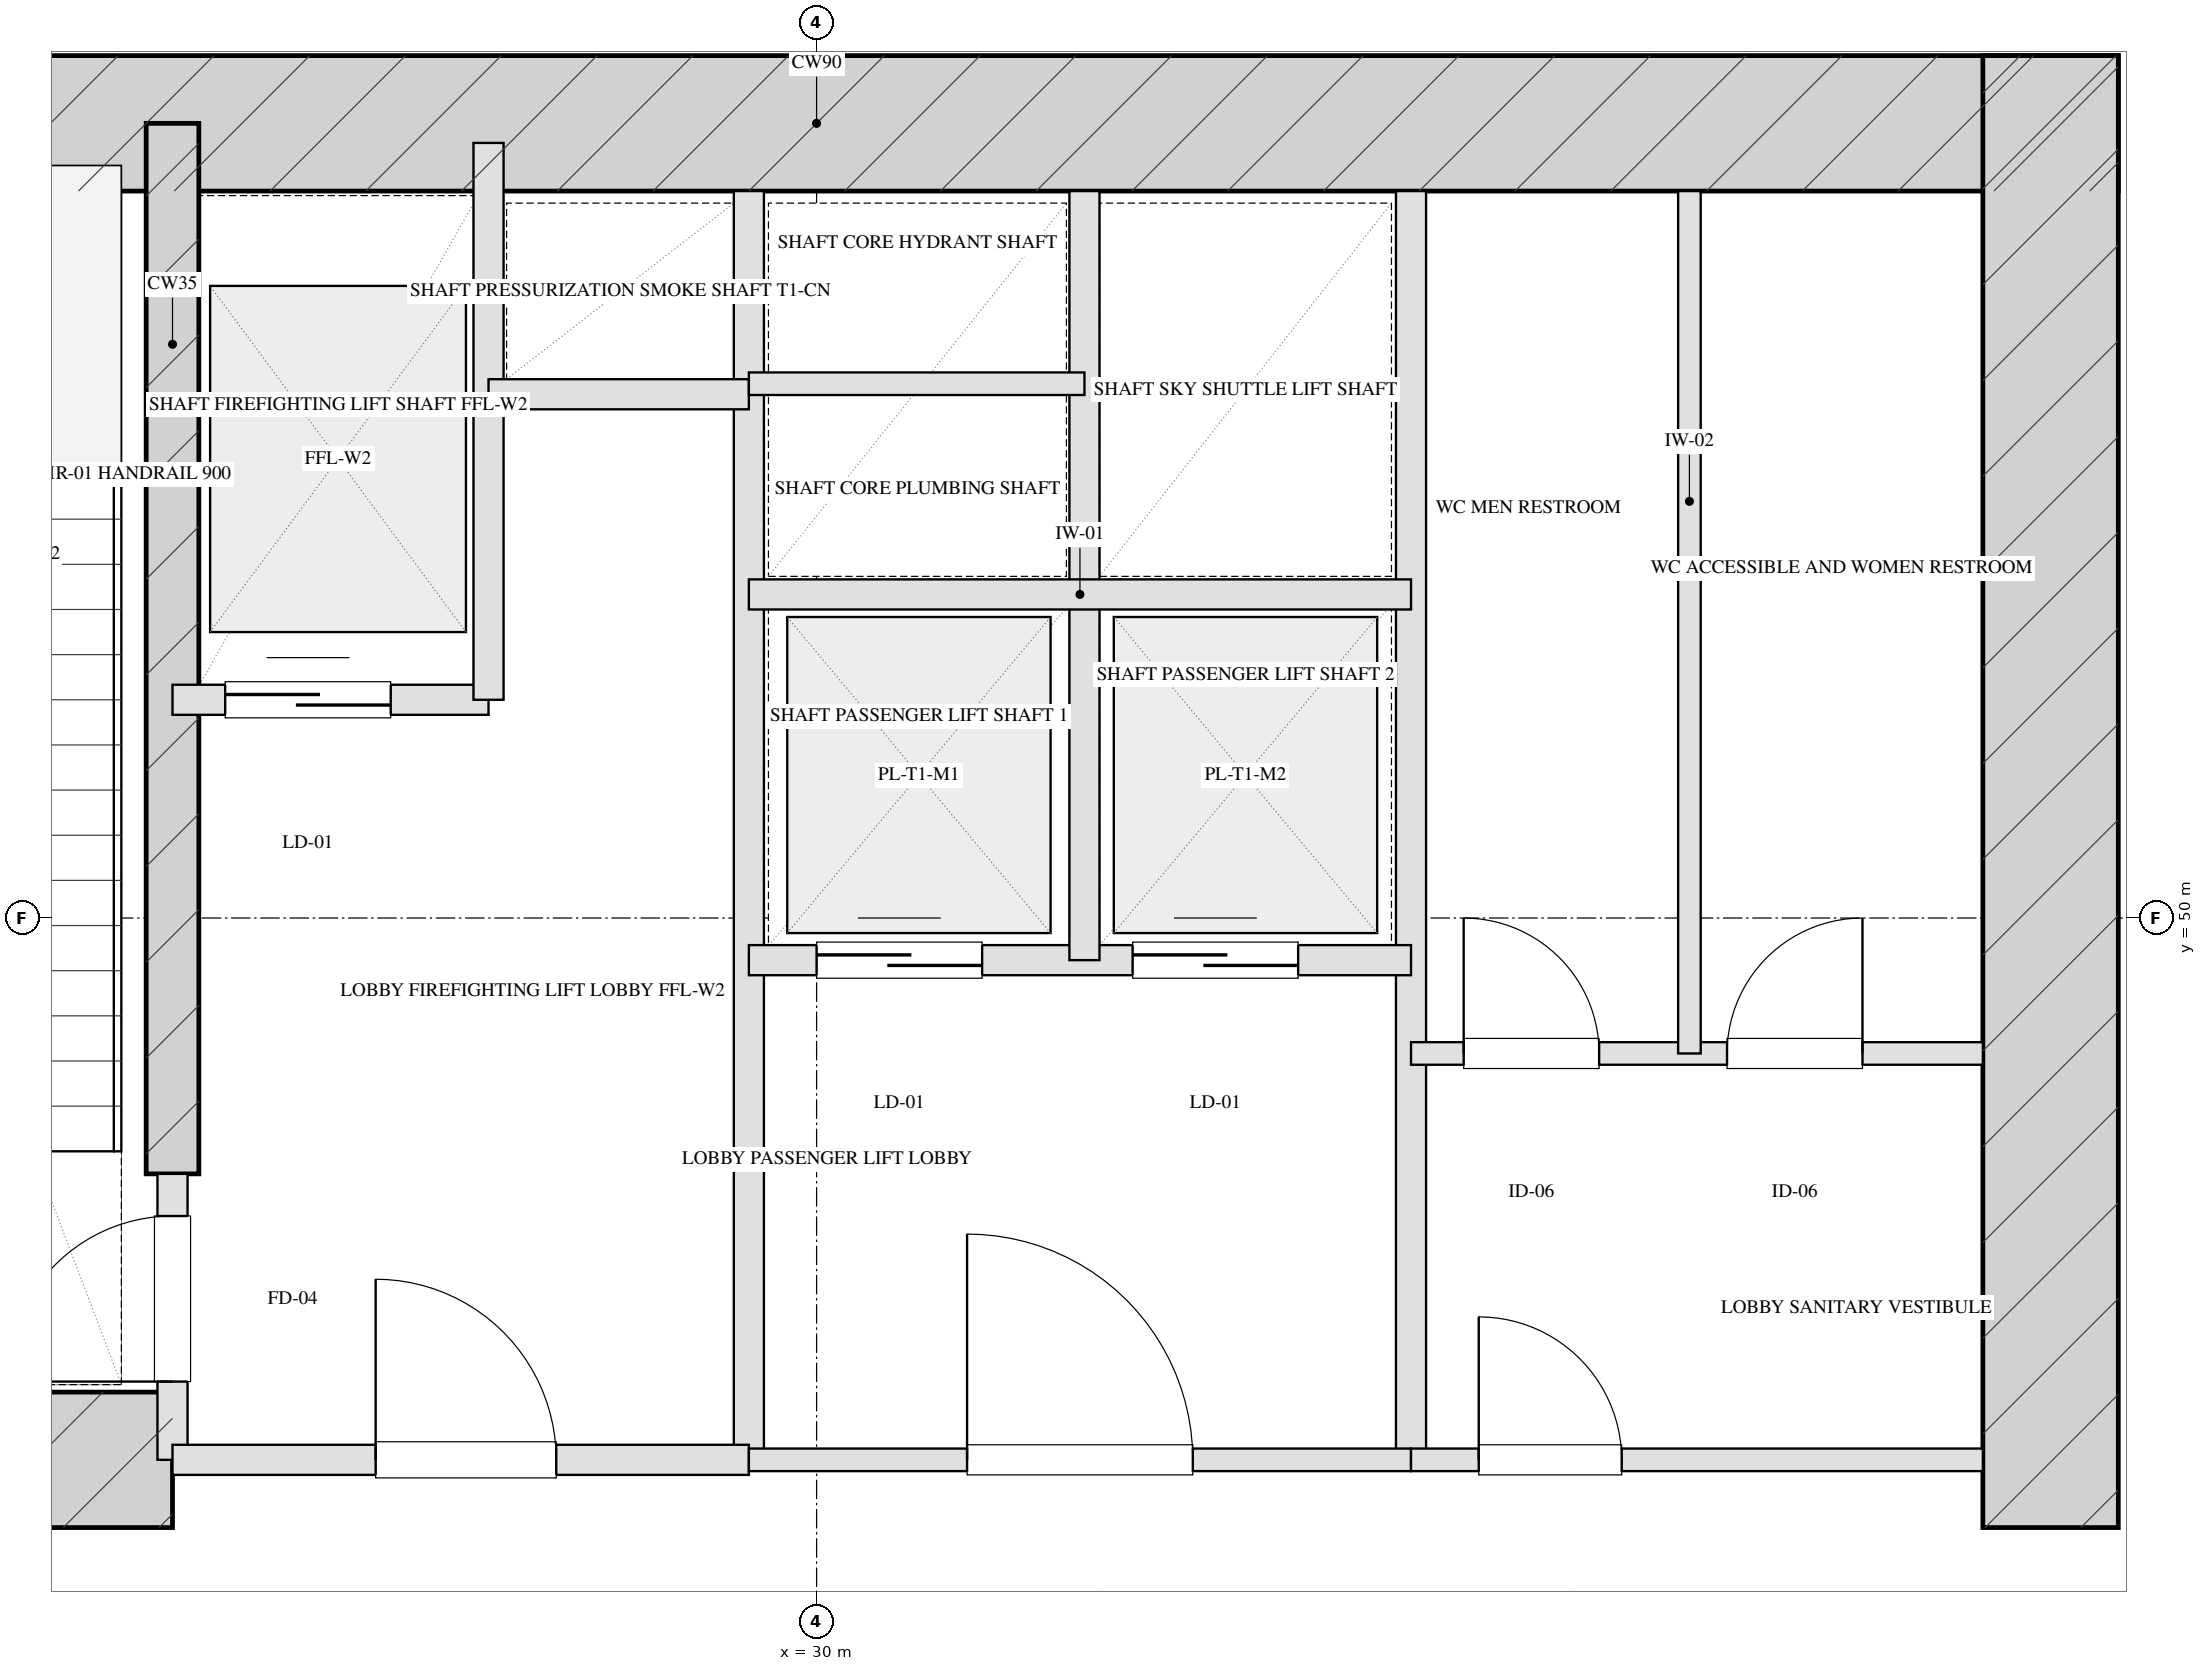
"""IFC4 building model, lengths in metres.
Left out: names, types, materials, properties, quantities, classifications, styles, units other than length and angle.
Written with IfcOpenShell. Run it as: python <this file> out.ifc"""

import sys

from ifc_helpers import new_model, si_unit, direction, frame, frame_2d, origin, place, context, subcontext, project, spatial, rectangle, extrude, element, fill, save


model = new_model("IFC4")
c1 = context("Model", 3, precision=1e-05, world=origin(), true_north=direction((0.0, 1.0)))
c2 = subcontext(c1, "Body", "Model", "MODEL_VIEW")
j1 = project(units=[si_unit("LENGTHUNIT", "METRE"), si_unit("PLANEANGLEUNIT", "RADIAN")], contexts=[c1])
p1 = place(None, origin())
s1 = spatial("IfcSite", under=j1, at=p1, CompositionType="ELEMENT")
p2 = place(p1, origin())
s2 = spatial("IfcBuilding", under=s1, at=p2, CompositionType="ELEMENT")
p3 = place(p2, frame((0.0, 0.0, 6.0)))
s3 = spatial("IfcBuildingStorey", under=s2, at=p3, CompositionType="ELEMENT", Elevation=6.0)
p4 = place(p3, frame((21.35, 55.28, 0.0), z_axis=(0.0, 0.0, 1.0), x_axis=(1.0, 0.0, 0.0)))
e1 = element("IfcWall", 1, at=p4, inside=s3, PredefinedType="SHEAR", context=c2, shape_type="SweptSolid", body=[
    extrude(rectangle(XDim=17.3, YDim=0.9, at=frame_2d((8.65, 0.0))), origin(), (0.0, 0.0, 1.0), 5.5),
])
p5 = place(p3, frame((38.2, 45.95, 0.0), z_axis=(0.0, 0.0, 1.0), x_axis=(0.0, 1.0, 0.0)))
e2 = element("IfcWall", 2, at=p5, inside=s3, PredefinedType="SHEAR", context=c2, shape_type="SweptSolid", body=[
    extrude(rectangle(XDim=9.78, YDim=0.9, at=frame_2d((4.89, 0.0))), origin(), (0.0, 0.0, 1.0), 5.5),
])
p6 = place(p3, frame((25.72, 48.3, 0.0), z_axis=(0.0, 0.0, 1.0), x_axis=(0.0, 1.0, 0.0)))
e3 = element("IfcWall", 3, at=p6, inside=s3, PredefinedType="SHEAR", context=c2, shape_type="SweptSolid", body=[
    extrude(rectangle(XDim=6.98, YDim=0.35, at=frame_2d((3.49, 0.0))), origin(), (0.0, 0.0, 1.0), 5.5),
])
p7 = place(p3, frame((21.35, 46.4, 0.0), z_axis=(0.0, 0.0, 1.0), x_axis=(1.0, 0.0, 0.0)))
e4 = element("IfcWall", 4, at=p7, inside=s3, PredefinedType="SHEAR", context=c2, shape_type="SweptSolid", body=[
    extrude(rectangle(XDim=4.37, YDim=0.9, at=frame_2d((2.185, 0.0))), origin(), (0.0, 0.0, 1.0), 5.5),
])
p8 = place(p3, frame((25.72, 46.4, 0.0), z_axis=(0.0, 0.0, 1.0), x_axis=(0.0, 1.0, 0.0)))
e5 = element("IfcWall", 5, at=p8, inside=s3, PredefinedType="PARTITIONING", context=c2, shape_type="SweptSolid", body=[
    extrude(rectangle(XDim=1.9, YDim=0.2, at=frame_2d((0.95, 0.0))), origin(), (0.0, 0.0, 1.0), 5.185),
])
p9 = place(p8, frame((0.52, 0.0, 0.0)))
e6 = element("IfcOpeningElement", 6, at=p9, cuts=e5, PredefinedType="OPENING", context=c2, shape_type="SweptSolid", body=[
    extrude(rectangle(XDim=1.1, YDim=2.05, at=frame_2d((0.55, 1.025))), frame((0.0, 0.11, 0.0), z_axis=(0.0, -1.0, 0.0), x_axis=(1.0, 0.0, 0.0)), (0.0, 0.0, 1.0), 0.22),
])
p10 = place(p3, frame((29.55, 46.4, 0.0), z_axis=(0.0, 0.0, 1.0), x_axis=(0.0, 1.0, 0.0)))
e7 = element("IfcWall", 7, at=p10, inside=s3, PredefinedType="PARTITIONING", context=c2, shape_type="SweptSolid", body=[
    extrude(rectangle(XDim=8.43, YDim=0.2, at=frame_2d((4.215, 0.0))), origin(), (0.0, 0.0, 1.0), 5.185),
])
p11 = place(p3, frame((25.72, 46.4, 0.0), z_axis=(0.0, 0.0, 1.0), x_axis=(1.0, 0.0, 0.0)))
e8 = element("IfcWall", 8, at=p11, inside=s3, PredefinedType="PARTITIONING", context=c2, shape_type="SweptSolid", body=[
    extrude(rectangle(XDim=3.83, YDim=0.2, at=frame_2d((1.915, 0.0))), origin(), (0.0, 0.0, 1.0), 5.185),
])
p12 = place(p11, frame((1.35, 0.0, 0.0)))
e9 = element("IfcOpeningElement", 9, at=p12, cuts=e8, PredefinedType="OPENING", context=c2, shape_type="SweptSolid", body=[
    extrude(rectangle(XDim=1.2, YDim=2.05, at=frame_2d((0.6, 1.025))), frame((0.0, 0.11, 0.0), z_axis=(0.0, -1.0, 0.0), x_axis=(1.0, 0.0, 0.0)), (0.0, 0.0, 1.0), 0.22),
])
p13 = place(p3, frame((25.72, 51.45, 0.0), z_axis=(0.0, 0.0, 1.0), x_axis=(1.0, 0.0, 0.0)))
e10 = element("IfcWall", 10, at=p13, inside=s3, PredefinedType="PARTITIONING", context=c2, shape_type="SweptSolid", body=[
    extrude(rectangle(XDim=2.1, YDim=0.2, at=frame_2d((1.05, 0.0))), origin(), (0.0, 0.0, 1.0), 5.185),
])
p14 = place(p13, frame((0.35, 0.0, 0.0)))
e11 = element("IfcOpeningElement", 11, at=p14, cuts=e10, PredefinedType="OPENING", context=c2, shape_type="SweptSolid", body=[
    extrude(rectangle(XDim=1.1, YDim=2.05, at=frame_2d((0.55, 1.025))), frame((0.0, 0.11, 0.0), z_axis=(0.0, -1.0, 0.0), x_axis=(1.0, 0.0, 0.0)), (0.0, 0.0, 1.0), 0.22),
])
p15 = place(p3, frame((27.82, 51.45, 0.0), z_axis=(0.0, 0.0, 1.0), x_axis=(0.0, 1.0, 0.0)))
e12 = element("IfcWall", 12, at=p15, inside=s3, PredefinedType="PARTITIONING", context=c2, shape_type="SweptSolid", body=[
    extrude(rectangle(XDim=3.7, YDim=0.2, at=frame_2d((1.85, 0.0))), origin(), (0.0, 0.0, 1.0), 5.185),
])
p16 = place(p3, frame((27.82, 53.48, 0.0), z_axis=(0.0, 0.0, 1.0), x_axis=(1.0, 0.0, 0.0)))
e13 = element("IfcWall", 13, at=p16, inside=s3, PredefinedType="PARTITIONING", context=c2, shape_type="SweptSolid", body=[
    extrude(rectangle(XDim=1.73, YDim=0.2, at=frame_2d((0.865, 0.0))), origin(), (0.0, 0.0, 1.0), 5.185),
])
p17 = place(p3, frame((33.95, 46.4, 0.0), z_axis=(0.0, 0.0, 1.0), x_axis=(0.0, 1.0, 0.0)))
e14 = element("IfcWall", 14, at=p17, inside=s3, PredefinedType="PARTITIONING", context=c2, shape_type="SweptSolid", body=[
    extrude(rectangle(XDim=8.43, YDim=0.2, at=frame_2d((4.215, 0.0))), origin(), (0.0, 0.0, 1.0), 5.185),
])
p18 = place(p3, frame((29.55, 46.4, 0.0), z_axis=(0.0, 0.0, 1.0), x_axis=(1.0, 0.0, 0.0)))
e15 = element("IfcWall", 15, at=p18, inside=s3, PredefinedType="PARTITIONING", context=c2, shape_type="SweptSolid", body=[
    extrude(rectangle(XDim=4.4, YDim=0.15, at=frame_2d((2.2, 0.0))), origin(), (0.0, 0.0, 1.0), 5.185),
])
p19 = place(p18, frame((1.45, 0.0, 0.0)))
e16 = element("IfcOpeningElement", 16, at=p19, cuts=e15, PredefinedType="OPENING", context=c2, shape_type="SweptSolid", body=[
    extrude(rectangle(XDim=1.5, YDim=2.05, at=frame_2d((0.75, 1.025))), frame((0.0, 0.085, 0.0), z_axis=(0.0, -1.0, 0.0), x_axis=(1.0, 0.0, 0.0)), (0.0, 0.0, 1.0), 0.17),
])
p20 = place(p3, frame((29.55, 49.72, 0.0), z_axis=(0.0, 0.0, 1.0), x_axis=(1.0, 0.0, 0.0)))
e17 = element("IfcWall", 17, at=p20, inside=s3, PredefinedType="PARTITIONING", context=c2, shape_type="SweptSolid", body=[
    extrude(rectangle(XDim=4.4, YDim=0.2, at=frame_2d((2.2, 0.0))), origin(), (0.0, 0.0, 1.0), 5.185),
])
p21 = place(p20, frame((0.45, 0.0, 0.0)))
e18 = element("IfcOpeningElement", 18, at=p21, cuts=e17, PredefinedType="OPENING", context=c2, shape_type="SweptSolid", body=[
    extrude(rectangle(XDim=1.1, YDim=2.05, at=frame_2d((0.55, 1.025))), frame((0.0, 0.11, 0.0), z_axis=(0.0, -1.0, 0.0), x_axis=(1.0, 0.0, 0.0)), (0.0, 0.0, 1.0), 0.22),
])
p22 = place(p20, frame((2.55, 0.0, 0.0)))
e19 = element("IfcOpeningElement", 19, at=p22, cuts=e17, PredefinedType="OPENING", context=c2, shape_type="SweptSolid", body=[
    extrude(rectangle(XDim=1.1, YDim=2.05, at=frame_2d((0.55, 1.025))), frame((0.0, 0.11, 0.0), z_axis=(0.0, -1.0, 0.0), x_axis=(1.0, 0.0, 0.0)), (0.0, 0.0, 1.0), 0.22),
])
p23 = place(p3, frame((31.78, 49.72, 0.0), z_axis=(0.0, 0.0, 1.0), x_axis=(0.0, 1.0, 0.0)))
e20 = element("IfcWall", 20, at=p23, inside=s3, PredefinedType="PARTITIONING", context=c2, shape_type="SweptSolid", body=[
    extrude(rectangle(XDim=5.11, YDim=0.2, at=frame_2d((2.555, 0.0))), origin(), (0.0, 0.0, 1.0), 5.185),
])
p24 = place(p3, frame((29.55, 52.15, 0.0), z_axis=(0.0, 0.0, 1.0), x_axis=(1.0, 0.0, 0.0)))
e21 = element("IfcWall", 21, at=p24, inside=s3, PredefinedType="PARTITIONING", context=c2, shape_type="SweptSolid", body=[
    extrude(rectangle(XDim=4.4, YDim=0.2, at=frame_2d((2.2, 0.0))), origin(), (0.0, 0.0, 1.0), 5.185),
])
p25 = place(p3, frame((29.55, 53.55, 0.0), z_axis=(0.0, 0.0, 1.0), x_axis=(1.0, 0.0, 0.0)))
e22 = element("IfcWall", 22, at=p25, inside=s3, PredefinedType="PARTITIONING", context=c2, shape_type="SweptSolid", body=[
    extrude(rectangle(XDim=2.23, YDim=0.15, at=frame_2d((1.115, 0.0))), origin(), (0.0, 0.0, 1.0), 5.185),
])
p26 = place(p3, frame((33.95, 46.4, 0.0), z_axis=(0.0, 0.0, 1.0), x_axis=(1.0, 0.0, 0.0)))
e23 = element("IfcWall", 23, at=p26, inside=s3, PredefinedType="PARTITIONING", context=c2, shape_type="SweptSolid", body=[
    extrude(rectangle(XDim=3.8, YDim=0.15, at=frame_2d((1.9, 0.0))), origin(), (0.0, 0.0, 1.0), 5.185),
])
p27 = place(p26, frame((0.45, 0.0, 0.0)))
e24 = element("IfcOpeningElement", 24, at=p27, cuts=e23, PredefinedType="OPENING", context=c2, shape_type="SweptSolid", body=[
    extrude(rectangle(XDim=0.95, YDim=2.05, at=frame_2d((0.475, 1.025))), frame((0.0, 0.085, 0.0), z_axis=(0.0, -1.0, 0.0), x_axis=(1.0, 0.0, 0.0)), (0.0, 0.0, 1.0), 0.17),
])
p28 = place(p3, frame((33.95, 49.1, 0.0), z_axis=(0.0, 0.0, 1.0), x_axis=(1.0, 0.0, 0.0)))
e25 = element("IfcWall", 25, at=p28, inside=s3, PredefinedType="PARTITIONING", context=c2, shape_type="SweptSolid", body=[
    extrude(rectangle(XDim=3.8, YDim=0.15, at=frame_2d((1.9, 0.0))), origin(), (0.0, 0.0, 1.0), 5.185),
])
p29 = place(p28, frame((0.35, 0.0, 0.0)))
e26 = element("IfcOpeningElement", 26, at=p29, cuts=e25, PredefinedType="OPENING", context=c2, shape_type="SweptSolid", body=[
    extrude(rectangle(XDim=0.9, YDim=2.05, at=frame_2d((0.45, 1.025))), frame((0.0, 0.085, 0.0), z_axis=(0.0, -1.0, 0.0), x_axis=(1.0, 0.0, 0.0)), (0.0, 0.0, 1.0), 0.17),
])
p30 = place(p28, frame((2.1, 0.0, 0.0)))
e27 = element("IfcOpeningElement", 27, at=p30, cuts=e25, PredefinedType="OPENING", context=c2, shape_type="SweptSolid", body=[
    extrude(rectangle(XDim=0.9, YDim=2.05, at=frame_2d((0.45, 1.025))), frame((0.0, 0.085, 0.0), z_axis=(0.0, -1.0, 0.0), x_axis=(1.0, 0.0, 0.0)), (0.0, 0.0, 1.0), 0.17),
])
p31 = place(p3, frame((35.8, 49.1, 0.0), z_axis=(0.0, 0.0, 1.0), x_axis=(0.0, 1.0, 0.0)))
e28 = element("IfcWall", 28, at=p31, inside=s3, PredefinedType="PARTITIONING", context=c2, shape_type="SweptSolid", body=[
    extrude(rectangle(XDim=5.73, YDim=0.15, at=frame_2d((2.865, 0.0))), origin(), (0.0, 0.0, 1.0), 5.185),
])
p32 = place(p9, origin())
e29 = element("IfcDoor", 29, at=p32, inside=s3, OperationType="SINGLE_SWING_LEFT", PredefinedType="DOOR", context=c2, shape_type="SweptSolid", body=[
    extrude(rectangle(XDim=1.1, YDim=2.05, at=frame_2d((0.55, 1.025))), frame((0.0, 0.025, 0.0), z_axis=(0.0, -1.0, 0.0), x_axis=(1.0, 0.0, 0.0)), (0.0, 0.0, 1.0), 0.05),
])
fill(e6, e29)
p33 = place(p12, origin())
e30 = element("IfcDoor", 30, at=p33, inside=s3, OperationType="SINGLE_SWING_LEFT", PredefinedType="DOOR", context=c2, shape_type="SweptSolid", body=[
    extrude(rectangle(XDim=1.2, YDim=2.05, at=frame_2d((0.6, 1.025))), frame((0.0, 0.025, 0.0), z_axis=(0.0, -1.0, 0.0), x_axis=(1.0, 0.0, 0.0)), (0.0, 0.0, 1.0), 0.05),
])
fill(e9, e30)
p34 = place(p14, origin())
e31 = element("IfcDoor", 31, at=p34, inside=s3, OperationType="DOUBLE_DOOR_SLIDING", PredefinedType="DOOR", context=c2, shape_type="SweptSolid", body=[
    extrude(rectangle(XDim=1.1, YDim=2.05, at=frame_2d((0.55, 1.025))), frame((0.0, 0.025, 0.0), z_axis=(0.0, -1.0, 0.0), x_axis=(1.0, 0.0, 0.0)), (0.0, 0.0, 1.0), 0.05),
])
fill(e11, e31)
p35 = place(p19, origin())
e32 = element("IfcDoor", 32, at=p35, inside=s3, OperationType="SINGLE_SWING_LEFT", PredefinedType="DOOR", context=c2, shape_type="SweptSolid", body=[
    extrude(rectangle(XDim=1.5, YDim=2.05, at=frame_2d((0.75, 1.025))), frame((0.0, 0.025, 0.0), z_axis=(0.0, -1.0, 0.0), x_axis=(1.0, 0.0, 0.0)), (0.0, 0.0, 1.0), 0.05),
])
fill(e16, e32)
p36 = place(p21, origin())
e33 = element("IfcDoor", 33, at=p36, inside=s3, OperationType="DOUBLE_DOOR_SLIDING", PredefinedType="DOOR", context=c2, shape_type="SweptSolid", body=[
    extrude(rectangle(XDim=1.1, YDim=2.05, at=frame_2d((0.55, 1.025))), frame((0.0, 0.025, 0.0), z_axis=(0.0, -1.0, 0.0), x_axis=(1.0, 0.0, 0.0)), (0.0, 0.0, 1.0), 0.05),
])
fill(e18, e33)
p37 = place(p22, origin())
e34 = element("IfcDoor", 34, at=p37, inside=s3, OperationType="DOUBLE_DOOR_SLIDING", PredefinedType="DOOR", context=c2, shape_type="SweptSolid", body=[
    extrude(rectangle(XDim=1.1, YDim=2.05, at=frame_2d((0.55, 1.025))), frame((0.0, 0.025, 0.0), z_axis=(0.0, -1.0, 0.0), x_axis=(1.0, 0.0, 0.0)), (0.0, 0.0, 1.0), 0.05),
])
fill(e19, e34)
p38 = place(p27, origin())
e35 = element("IfcDoor", 35, at=p38, inside=s3, OperationType="SINGLE_SWING_LEFT", PredefinedType="DOOR", context=c2, shape_type="SweptSolid", body=[
    extrude(rectangle(XDim=0.95, YDim=2.05, at=frame_2d((0.475, 1.025))), frame((0.0, 0.025, 0.0), z_axis=(0.0, -1.0, 0.0), x_axis=(1.0, 0.0, 0.0)), (0.0, 0.0, 1.0), 0.05),
])
fill(e24, e35)
p39 = place(p29, origin())
e36 = element("IfcDoor", 36, at=p39, inside=s3, OperationType="SINGLE_SWING_LEFT", PredefinedType="DOOR", context=c2, shape_type="SweptSolid", body=[
    extrude(rectangle(XDim=0.9, YDim=2.05, at=frame_2d((0.45, 1.025))), frame((0.0, 0.025, 0.0), z_axis=(0.0, -1.0, 0.0), x_axis=(1.0, 0.0, 0.0)), (0.0, 0.0, 1.0), 0.05),
])
fill(e26, e36)
p40 = place(p30, origin())
e37 = element("IfcDoor", 37, at=p40, inside=s3, OperationType="SINGLE_SWING_RIGHT", PredefinedType="DOOR", context=c2, shape_type="SweptSolid", body=[
    extrude(rectangle(XDim=0.9, YDim=2.05, at=frame_2d((0.45, 1.025))), frame((0.0, 0.025, 0.0), z_axis=(0.0, -1.0, 0.0), x_axis=(1.0, 0.0, 0.0)), (0.0, 0.0, 1.0), 0.05),
])
fill(e27, e37)
save(model, sys.argv[1])
